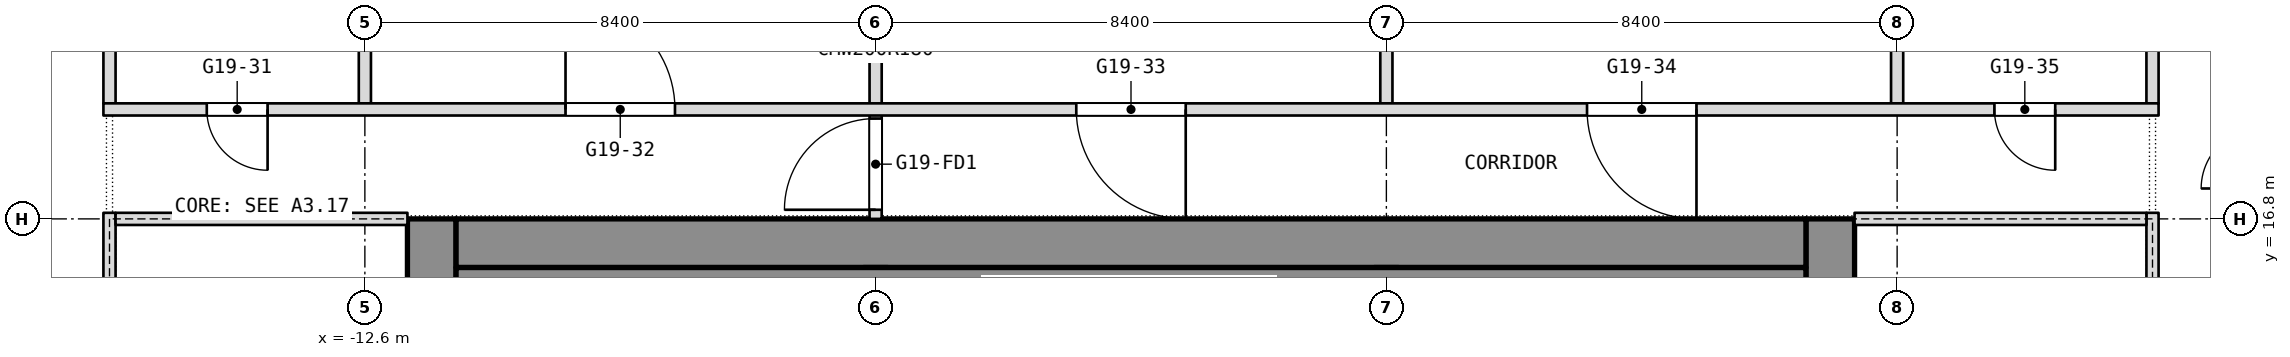
"""IFC4 building model, lengths in metres.
Left out: names, types, materials, properties, quantities, classifications, styles, units other than length and angle.
Written with IfcOpenShell. Run it as: python <this file> out.ifc"""

import sys

from ifc_helpers import new_model, si_unit, direction, frame, frame_2d, origin, place, context, subcontext, project, spatial, rectangle, extrude, element, fill, save


model = new_model("IFC4")
c1 = context("Model", 3, precision=1e-05, world=origin(), true_north=direction((0.0, 1.0)))
c2 = subcontext(c1, "Body", "Model", "MODEL_VIEW")
j1 = project(units=[si_unit("LENGTHUNIT", "METRE"), si_unit("PLANEANGLEUNIT", "RADIAN")], contexts=[c1])
p1 = place(None, origin())
s1 = spatial("IfcSite", under=j1, at=p1, CompositionType="ELEMENT")
p2 = place(p1, origin())
s2 = spatial("IfcBuilding", under=s1, at=p2, CompositionType="ELEMENT")
p3 = place(p2, frame((0.0, 0.0, 227.3)))
s3 = spatial("IfcBuildingStorey", under=s2, at=p3, CompositionType="ELEMENT", Elevation=227.3)
p4 = place(p3, frame((11.5, 0.0, 0.0), z_axis=(0.0, 0.0, 1.0), x_axis=(0.0, 1.0, 0.0)))
e1 = element("IfcWall", 1, at=p4, inside=s3, PredefinedType="SHEAR", context=c2, shape_type="SweptSolid", body=[
    extrude(rectangle(XDim=16.8, YDim=0.8, at=frame_2d((8.4, 0.0))), origin(), (0.0, 0.0, 1.0), 3.6),
])
p5 = place(p4, frame((2.3, 0.0, 0.0)))
e2 = element("IfcOpeningElement", 2, at=p5, cuts=e1, PredefinedType="OPENING", context=c2, shape_type="SweptSolid", body=[
    extrude(rectangle(XDim=1.1, YDim=2.1, at=frame_2d((0.55, 1.05))), frame((0.0, 0.4, 0.0), z_axis=(0.0, -1.0, 0.0), x_axis=(1.0, 0.0, 0.0)), (0.0, 0.0, 1.0), 0.8),
])
p6 = place(p4, frame((4.85, 0.0, 0.0)))
e3 = element("IfcOpeningElement", 3, at=p6, cuts=e1, PredefinedType="OPENING", context=c2, shape_type="SweptSolid", body=[
    extrude(rectangle(XDim=1.1, YDim=2.1, at=frame_2d((0.55, 1.05))), frame((0.0, 0.4, 0.0), z_axis=(0.0, -1.0, 0.0), x_axis=(1.0, 0.0, 0.0)), (0.0, 0.0, 1.0), 0.8),
])
p7 = place(p4, frame((6.825, 0.0, 0.0)))
e4 = element("IfcOpeningElement", 4, at=p7, cuts=e1, PredefinedType="OPENING", context=c2, shape_type="SweptSolid", body=[
    extrude(rectangle(XDim=1.2, YDim=2.1, at=frame_2d((0.6, 1.05))), frame((0.0, 0.4, 0.0), z_axis=(0.0, -1.0, 0.0), x_axis=(1.0, 0.0, 0.0)), (0.0, 0.0, 1.0), 0.8),
])
p8 = place(p4, frame((13.4, 0.0, 0.0)))
e5 = element("IfcOpeningElement", 5, at=p8, cuts=e1, PredefinedType="OPENING", context=c2, shape_type="SweptSolid", body=[
    extrude(rectangle(XDim=1.1, YDim=2.1, at=frame_2d((0.55, 1.05))), frame((0.0, 0.4, 0.0), z_axis=(0.0, -1.0, 0.0), x_axis=(1.0, 0.0, 0.0)), (0.0, 0.0, 1.0), 0.8),
])
p9 = place(p4, frame((10.85, 0.0, 0.0)))
e6 = element("IfcOpeningElement", 6, at=p9, cuts=e1, PredefinedType="OPENING", context=c2, shape_type="SweptSolid", body=[
    extrude(rectangle(XDim=1.1, YDim=2.1, at=frame_2d((0.55, 1.05))), frame((0.0, 0.4, 0.0), z_axis=(0.0, -1.0, 0.0), x_axis=(1.0, 0.0, 0.0)), (0.0, 0.0, 1.0), 0.8),
])
p10 = place(p4, frame((8.775, 0.0, 0.0)))
e7 = element("IfcOpeningElement", 7, at=p10, cuts=e1, PredefinedType="OPENING", context=c2, shape_type="SweptSolid", body=[
    extrude(rectangle(XDim=1.2, YDim=2.1, at=frame_2d((0.6, 1.05))), frame((0.0, 0.4, 0.0), z_axis=(0.0, -1.0, 0.0), x_axis=(1.0, 0.0, 0.0)), (0.0, 0.0, 1.0), 0.8),
])
p11 = place(p3, frame((-11.5, 0.0, 0.0), z_axis=(0.0, 0.0, 1.0), x_axis=(0.0, 1.0, 0.0)))
e8 = element("IfcWall", 8, at=p11, inside=s3, PredefinedType="SHEAR", context=c2, shape_type="SweptSolid", body=[
    extrude(rectangle(XDim=16.8, YDim=0.8, at=frame_2d((8.4, 0.0))), origin(), (0.0, 0.0, 1.0), 3.6),
])
p12 = place(p11, frame((1.688, 0.0, 0.0)))
e9 = element("IfcOpeningElement", 9, at=p12, cuts=e8, PredefinedType="OPENING", context=c2, shape_type="SweptSolid", body=[
    extrude(rectangle(XDim=0.9, YDim=2.1, at=frame_2d((0.45, 1.05))), frame((0.0, 0.4, 0.0), z_axis=(0.0, -1.0, 0.0), x_axis=(1.0, 0.0, 0.0)), (0.0, 0.0, 1.0), 0.8),
])
p13 = place(p11, frame((4.312, 0.0, 0.0)))
e10 = element("IfcOpeningElement", 10, at=p13, cuts=e8, PredefinedType="OPENING", context=c2, shape_type="SweptSolid", body=[
    extrude(rectangle(XDim=0.9, YDim=2.1, at=frame_2d((0.45, 1.05))), frame((0.0, 0.4, 0.0), z_axis=(0.0, -1.0, 0.0), x_axis=(1.0, 0.0, 0.0)), (0.0, 0.0, 1.0), 0.8),
])
p14 = place(p11, frame((6.825, 0.0, 0.0)))
e11 = element("IfcOpeningElement", 11, at=p14, cuts=e8, PredefinedType="OPENING", context=c2, shape_type="SweptSolid", body=[
    extrude(rectangle(XDim=1.2, YDim=2.1, at=frame_2d((0.6, 1.05))), frame((0.0, 0.4, 0.0), z_axis=(0.0, -1.0, 0.0), x_axis=(1.0, 0.0, 0.0)), (0.0, 0.0, 1.0), 0.8),
])
p15 = place(p11, frame((12.3, 0.0, 0.0)))
e12 = element("IfcOpeningElement", 12, at=p15, cuts=e8, PredefinedType="OPENING", context=c2, shape_type="SweptSolid", body=[
    extrude(rectangle(XDim=0.9, YDim=2.1, at=frame_2d((0.45, 1.05))), frame((0.0, 0.4, 0.0), z_axis=(0.0, -1.0, 0.0), x_axis=(1.0, 0.0, 0.0)), (0.0, 0.0, 1.0), 0.8),
])
p16 = place(p11, frame((8.775, 0.0, 0.0)))
e13 = element("IfcOpeningElement", 13, at=p16, cuts=e8, PredefinedType="OPENING", context=c2, shape_type="SweptSolid", body=[
    extrude(rectangle(XDim=1.2, YDim=2.1, at=frame_2d((0.6, 1.05))), frame((0.0, 0.4, 0.0), z_axis=(0.0, -1.0, 0.0), x_axis=(1.0, 0.0, 0.0)), (0.0, 0.0, 1.0), 0.8),
])
p17 = place(p3, frame((-11.1, 16.4, 0.0), z_axis=(0.0, 0.0, 1.0), x_axis=(1.0, 0.0, 0.0)))
e14 = element("IfcWall", 14, at=p17, inside=s3, PredefinedType="SHEAR", context=c2, shape_type="SweptSolid", body=[
    extrude(rectangle(XDim=22.2, YDim=0.8, at=frame_2d((11.1, 0.0))), origin(), (0.0, 0.0, 1.0), 3.6),
])
p18 = place(p3, frame((-4.2, 0.8, 0.0), z_axis=(0.0, 0.0, 1.0), x_axis=(0.0, 1.0, 0.0)))
e15 = element("IfcWall", 15, at=p18, inside=s3, PredefinedType="SHEAR", context=c2, shape_type="SweptSolid", body=[
    extrude(rectangle(XDim=15.2, YDim=0.4, at=frame_2d((7.6, 0.0))), origin(), (0.0, 0.0, 1.0), 3.6),
])
p19 = place(p18, frame((8.5, 0.0, 0.0)))
e16 = element("IfcOpeningElement", 16, at=p19, cuts=e15, PredefinedType="OPENING", context=c2, shape_type="SweptSolid", body=[
    extrude(rectangle(XDim=1.2, YDim=2.1, at=frame_2d((0.6, 1.05))), frame((0.0, 0.2, 0.0), z_axis=(0.0, -1.0, 0.0), x_axis=(1.0, 0.0, 0.0)), (0.0, 0.0, 1.0), 0.4),
])
p20 = place(p3, frame((4.2, 0.8, 0.0), z_axis=(0.0, 0.0, 1.0), x_axis=(0.0, 1.0, 0.0)))
e17 = element("IfcWall", 17, at=p20, inside=s3, PredefinedType="SHEAR", context=c2, shape_type="SweptSolid", body=[
    extrude(rectangle(XDim=15.2, YDim=0.4, at=frame_2d((7.6, 0.0))), origin(), (0.0, 0.0, 1.0), 3.6),
])
p21 = place(p20, frame((5.95, 0.0, 0.0)))
e18 = element("IfcOpeningElement", 18, at=p21, cuts=e17, PredefinedType="OPENING", context=c2, shape_type="SweptSolid", body=[
    extrude(rectangle(XDim=1.2, YDim=2.1, at=frame_2d((0.6, 1.05))), frame((0.0, 0.2, 0.0), z_axis=(0.0, -1.0, 0.0), x_axis=(1.0, 0.0, 0.0)), (0.0, 0.0, 1.0), 0.4),
])
for number, where, z_axis, x_axis in (
    (19, (16.8, 18.7, 0.0), (0.0, 0.0, 1.0), (0.0, 1.0, 0.0)),
    (20, (12.6, 18.7, 0.0), (0.0, 0.0, 1.0), (0.0, 1.0, 0.0)),
    (21, (4.2, 18.7, 0.0), (0.0, 0.0, 1.0), (0.0, 1.0, 0.0)),
):
    element("IfcWall", number, at=place(p3, frame(where, z_axis=z_axis, x_axis=x_axis)), inside=s3, PredefinedType="PARTITIONING", context=c2, shape_type="SweptSolid", body=[
        extrude(rectangle(XDim=3.64, YDim=0.2, at=frame_2d((1.82, 0.0))), origin(), (0.0, 0.0, 1.0), 3.34),
    ])
p22 = place(p3, frame((-4.2, 16.8, 0.0), z_axis=(0.0, 0.0, 1.0), x_axis=(0.0, 1.0, 0.0)))
e22 = element("IfcWall", 22, at=p22, inside=s3, PredefinedType="PARTITIONING", context=c2, shape_type="SweptSolid", body=[
    extrude(rectangle(XDim=5.54, YDim=0.2, at=frame_2d((2.77, 0.0))), origin(), (0.0, 0.0, 1.0), 3.34),
])
p23 = place(p22, frame((0.15, 0.0, 0.0)))
e23 = element("IfcOpeningElement", 23, at=p23, cuts=e22, PredefinedType="OPENING", context=c2, shape_type="SweptSolid", body=[
    extrude(rectangle(XDim=1.5, YDim=2.1, at=frame_2d((0.75, 1.05))), frame((0.0, 0.1, 0.0), z_axis=(0.0, -1.0, 0.0), x_axis=(1.0, 0.0, 0.0)), (0.0, 0.0, 1.0), 0.2),
])
for number, where, z_axis, x_axis in (
    (24, (-12.6, 18.7, 0.0), (0.0, 0.0, 1.0), (0.0, 1.0, 0.0)),
    (25, (-16.8, 18.7, 0.0), (0.0, 0.0, 1.0), (0.0, 1.0, 0.0)),
):
    element("IfcWall", number, at=place(p3, frame(where, z_axis=z_axis, x_axis=x_axis)), inside=s3, PredefinedType="PARTITIONING", context=c2, shape_type="SweptSolid", body=[
        extrude(rectangle(XDim=3.64, YDim=0.2, at=frame_2d((1.82, 0.0))), origin(), (0.0, 0.0, 1.0), 3.34),
    ])
p24 = place(p3, frame((-16.9, 18.6, 0.0), z_axis=(0.0, 0.0, 1.0), x_axis=(1.0, 0.0, 0.0)))
e26 = element("IfcWall", 26, at=p24, inside=s3, PredefinedType="PARTITIONING", context=c2, shape_type="SweptSolid", body=[
    extrude(rectangle(XDim=33.8, YDim=0.2, at=frame_2d((16.9, 0.0))), origin(), (0.0, 0.0, 1.0), 3.34),
])
p25 = place(p24, frame((1.7, 0.0, 0.0)))
e27 = element("IfcOpeningElement", 27, at=p25, cuts=e26, PredefinedType="OPENING", context=c2, shape_type="SweptSolid", body=[
    extrude(rectangle(XDim=1.0, YDim=2.1, at=frame_2d((0.5, 1.05))), frame((0.0, 0.1, 0.0), z_axis=(0.0, -1.0, 0.0), x_axis=(1.0, 0.0, 0.0)), (0.0, 0.0, 1.0), 0.2),
])
p26 = place(p24, frame((7.6, 0.0, 0.0)))
e28 = element("IfcOpeningElement", 28, at=p26, cuts=e26, PredefinedType="OPENING", context=c2, shape_type="SweptSolid", body=[
    extrude(rectangle(XDim=1.8, YDim=2.1, at=frame_2d((0.9, 1.05))), frame((0.0, 0.1, 0.0), z_axis=(0.0, -1.0, 0.0), x_axis=(1.0, 0.0, 0.0)), (0.0, 0.0, 1.0), 0.2),
])
p27 = place(p24, frame((16.0, 0.0, 0.0)))
e29 = element("IfcOpeningElement", 29, at=p27, cuts=e26, PredefinedType="OPENING", context=c2, shape_type="SweptSolid", body=[
    extrude(rectangle(XDim=1.8, YDim=2.1, at=frame_2d((0.9, 1.05))), frame((0.0, 0.1, 0.0), z_axis=(0.0, -1.0, 0.0), x_axis=(1.0, 0.0, 0.0)), (0.0, 0.0, 1.0), 0.2),
])
p28 = place(p24, frame((24.4, 0.0, 0.0)))
e30 = element("IfcOpeningElement", 30, at=p28, cuts=e26, PredefinedType="OPENING", context=c2, shape_type="SweptSolid", body=[
    extrude(rectangle(XDim=1.8, YDim=2.1, at=frame_2d((0.9, 1.05))), frame((0.0, 0.1, 0.0), z_axis=(0.0, -1.0, 0.0), x_axis=(1.0, 0.0, 0.0)), (0.0, 0.0, 1.0), 0.2),
])
p29 = place(p24, frame((31.1, 0.0, 0.0)))
e31 = element("IfcOpeningElement", 31, at=p29, cuts=e26, PredefinedType="OPENING", context=c2, shape_type="SweptSolid", body=[
    extrude(rectangle(XDim=1.0, YDim=2.1, at=frame_2d((0.5, 1.05))), frame((0.0, 0.1, 0.0), z_axis=(0.0, -1.0, 0.0), x_axis=(1.0, 0.0, 0.0)), (0.0, 0.0, 1.0), 0.2),
])
p30 = place(p3, frame((-11.1, 15.65, 0.0), z_axis=(0.0, 0.0, 1.0), x_axis=(1.0, 0.0, 0.0)))
e32 = element("IfcWall", 32, at=p30, inside=s3, PredefinedType="PARTITIONING", context=c2, shape_type="SweptSolid", body=[
    extrude(rectangle(XDim=22.2, YDim=0.7, at=frame_2d((11.1, 0.0))), origin(), (0.0, 0.0, 1.0), 3.34),
])
p31 = place(p3, frame((-16.8, -0.1, 0.0), z_axis=(0.0, 0.0, 1.0), x_axis=(0.0, 1.0, 0.0)))
e33 = element("IfcWall", 33, at=p31, inside=s3, PredefinedType="PARTITIONING", context=c2, shape_type="SweptSolid", body=[
    extrude(rectangle(XDim=17.0, YDim=0.2, at=frame_2d((8.5, 0.0))), origin(), (0.0, 0.0, 1.0), 3.34),
])
p32 = place(p31, frame((2.2, 0.0, 0.0)))
e34 = element("IfcOpeningElement", 34, at=p32, cuts=e33, PredefinedType="OPENING", context=c2, shape_type="SweptSolid", body=[
    extrude(rectangle(XDim=1.8, YDim=2.1, at=frame_2d((0.9, 1.05))), frame((0.0, 0.1, 0.0), z_axis=(0.0, -1.0, 0.0), x_axis=(1.0, 0.0, 0.0)), (0.0, 0.0, 1.0), 0.2),
])
p33 = place(p31, frame((13.0, 0.0, 0.0)))
e35 = element("IfcOpeningElement", 35, at=p33, cuts=e33, PredefinedType="OPENING", context=c2, shape_type="SweptSolid", body=[
    extrude(rectangle(XDim=1.8, YDim=2.1, at=frame_2d((0.9, 1.05))), frame((0.0, 0.1, 0.0), z_axis=(0.0, -1.0, 0.0), x_axis=(1.0, 0.0, 0.0)), (0.0, 0.0, 1.0), 0.2),
])
p34 = place(p3, frame((-16.7, 16.8, 0.0), z_axis=(0.0, 0.0, 1.0), x_axis=(1.0, 0.0, 0.0)))
e36 = element("IfcWall", 36, at=p34, inside=s3, PredefinedType="PARTITIONING", context=c2, shape_type="SweptSolid", body=[
    extrude(rectangle(XDim=4.8, YDim=0.2, at=frame_2d((2.4, 0.0))), origin(), (0.0, 0.0, 1.0), 2.94),
])
p35 = place(p3, frame((16.8, -0.1, 0.0), z_axis=(0.0, 0.0, 1.0), x_axis=(0.0, 1.0, 0.0)))
e37 = element("IfcWall", 37, at=p35, inside=s3, PredefinedType="PARTITIONING", context=c2, shape_type="SweptSolid", body=[
    extrude(rectangle(XDim=17.0, YDim=0.2, at=frame_2d((8.5, 0.0))), origin(), (0.0, 0.0, 1.0), 3.34),
])
p36 = place(p35, frame((2.2, 0.0, 0.0)))
e38 = element("IfcOpeningElement", 38, at=p36, cuts=e37, PredefinedType="OPENING", context=c2, shape_type="SweptSolid", body=[
    extrude(rectangle(XDim=1.8, YDim=2.1, at=frame_2d((0.9, 1.05))), frame((0.0, 0.1, 0.0), z_axis=(0.0, -1.0, 0.0), x_axis=(1.0, 0.0, 0.0)), (0.0, 0.0, 1.0), 0.2),
])
p37 = place(p35, frame((13.0, 0.0, 0.0)))
e39 = element("IfcOpeningElement", 39, at=p37, cuts=e37, PredefinedType="OPENING", context=c2, shape_type="SweptSolid", body=[
    extrude(rectangle(XDim=1.8, YDim=2.1, at=frame_2d((0.9, 1.05))), frame((0.0, 0.1, 0.0), z_axis=(0.0, -1.0, 0.0), x_axis=(1.0, 0.0, 0.0)), (0.0, 0.0, 1.0), 0.2),
])
p38 = place(p3, frame((11.9, 16.8, 0.0), z_axis=(0.0, 0.0, 1.0), x_axis=(1.0, 0.0, 0.0)))
e40 = element("IfcWall", 40, at=p38, inside=s3, PredefinedType="PARTITIONING", context=c2, shape_type="SweptSolid", body=[
    extrude(rectangle(XDim=4.8, YDim=0.2, at=frame_2d((2.4, 0.0))), origin(), (0.0, 0.0, 1.0), 2.94),
])
p39 = place(p25, origin())
e41 = element("IfcDoor", 41, at=p39, inside=s3, OperationType="SINGLE_SWING_LEFT", PredefinedType="DOOR", context=c2, shape_type="SweptSolid", body=[
    extrude(rectangle(XDim=1.0, YDim=2.1, at=frame_2d((0.5, 1.05))), frame((0.0, 0.025, 0.0), z_axis=(0.0, -1.0, 0.0), x_axis=(1.0, 0.0, 0.0)), (0.0, 0.0, 1.0), 0.05),
])
fill(e27, e41)
p40 = place(p26, origin())
e42 = element("IfcDoor", 42, at=p40, inside=s3, OperationType="DOUBLE_DOOR_SINGLE_SWING", PredefinedType="DOOR", context=c2, shape_type="SweptSolid", body=[
    extrude(rectangle(XDim=1.8, YDim=2.1, at=frame_2d((0.9, 1.05))), frame((0.0, 0.025, 0.0), z_axis=(0.0, -1.0, 0.0), x_axis=(1.0, 0.0, 0.0)), (0.0, 0.0, 1.0), 0.05),
])
fill(e28, e42)
p41 = place(p27, origin())
e43 = element("IfcDoor", 43, at=p41, inside=s3, OperationType="DOUBLE_DOOR_SINGLE_SWING", PredefinedType="DOOR", context=c2, shape_type="SweptSolid", body=[
    extrude(rectangle(XDim=1.8, YDim=2.1, at=frame_2d((0.9, 1.05))), frame((0.0, 0.025, 0.0), z_axis=(0.0, -1.0, 0.0), x_axis=(1.0, 0.0, 0.0)), (0.0, 0.0, 1.0), 0.05),
])
fill(e29, e43)
p42 = place(p28, origin())
e44 = element("IfcDoor", 44, at=p42, inside=s3, OperationType="DOUBLE_DOOR_SINGLE_SWING", PredefinedType="DOOR", context=c2, shape_type="SweptSolid", body=[
    extrude(rectangle(XDim=1.8, YDim=2.1, at=frame_2d((0.9, 1.05))), frame((0.0, 0.025, 0.0), z_axis=(0.0, -1.0, 0.0), x_axis=(1.0, 0.0, 0.0)), (0.0, 0.0, 1.0), 0.05),
])
fill(e30, e44)
p43 = place(p29, origin())
e45 = element("IfcDoor", 45, at=p43, inside=s3, OperationType="SINGLE_SWING_LEFT", PredefinedType="DOOR", context=c2, shape_type="SweptSolid", body=[
    extrude(rectangle(XDim=1.0, YDim=2.1, at=frame_2d((0.5, 1.05))), frame((0.0, 0.025, 0.0), z_axis=(0.0, -1.0, 0.0), x_axis=(1.0, 0.0, 0.0)), (0.0, 0.0, 1.0), 0.05),
])
fill(e31, e45)
p44 = place(p23, origin())
e46 = element("IfcDoor", 46, at=p44, inside=s3, OperationType="DOUBLE_DOOR_DOUBLE_SWING", PredefinedType="DOOR", context=c2, shape_type="SweptSolid", body=[
    extrude(rectangle(XDim=1.5, YDim=2.1, at=frame_2d((0.75, 1.05))), frame((0.0, 0.025, 0.0), z_axis=(0.0, -1.0, 0.0), x_axis=(1.0, 0.0, 0.0)), (0.0, 0.0, 1.0), 0.05),
])
fill(e23, e46)
save(model, sys.argv[1])
